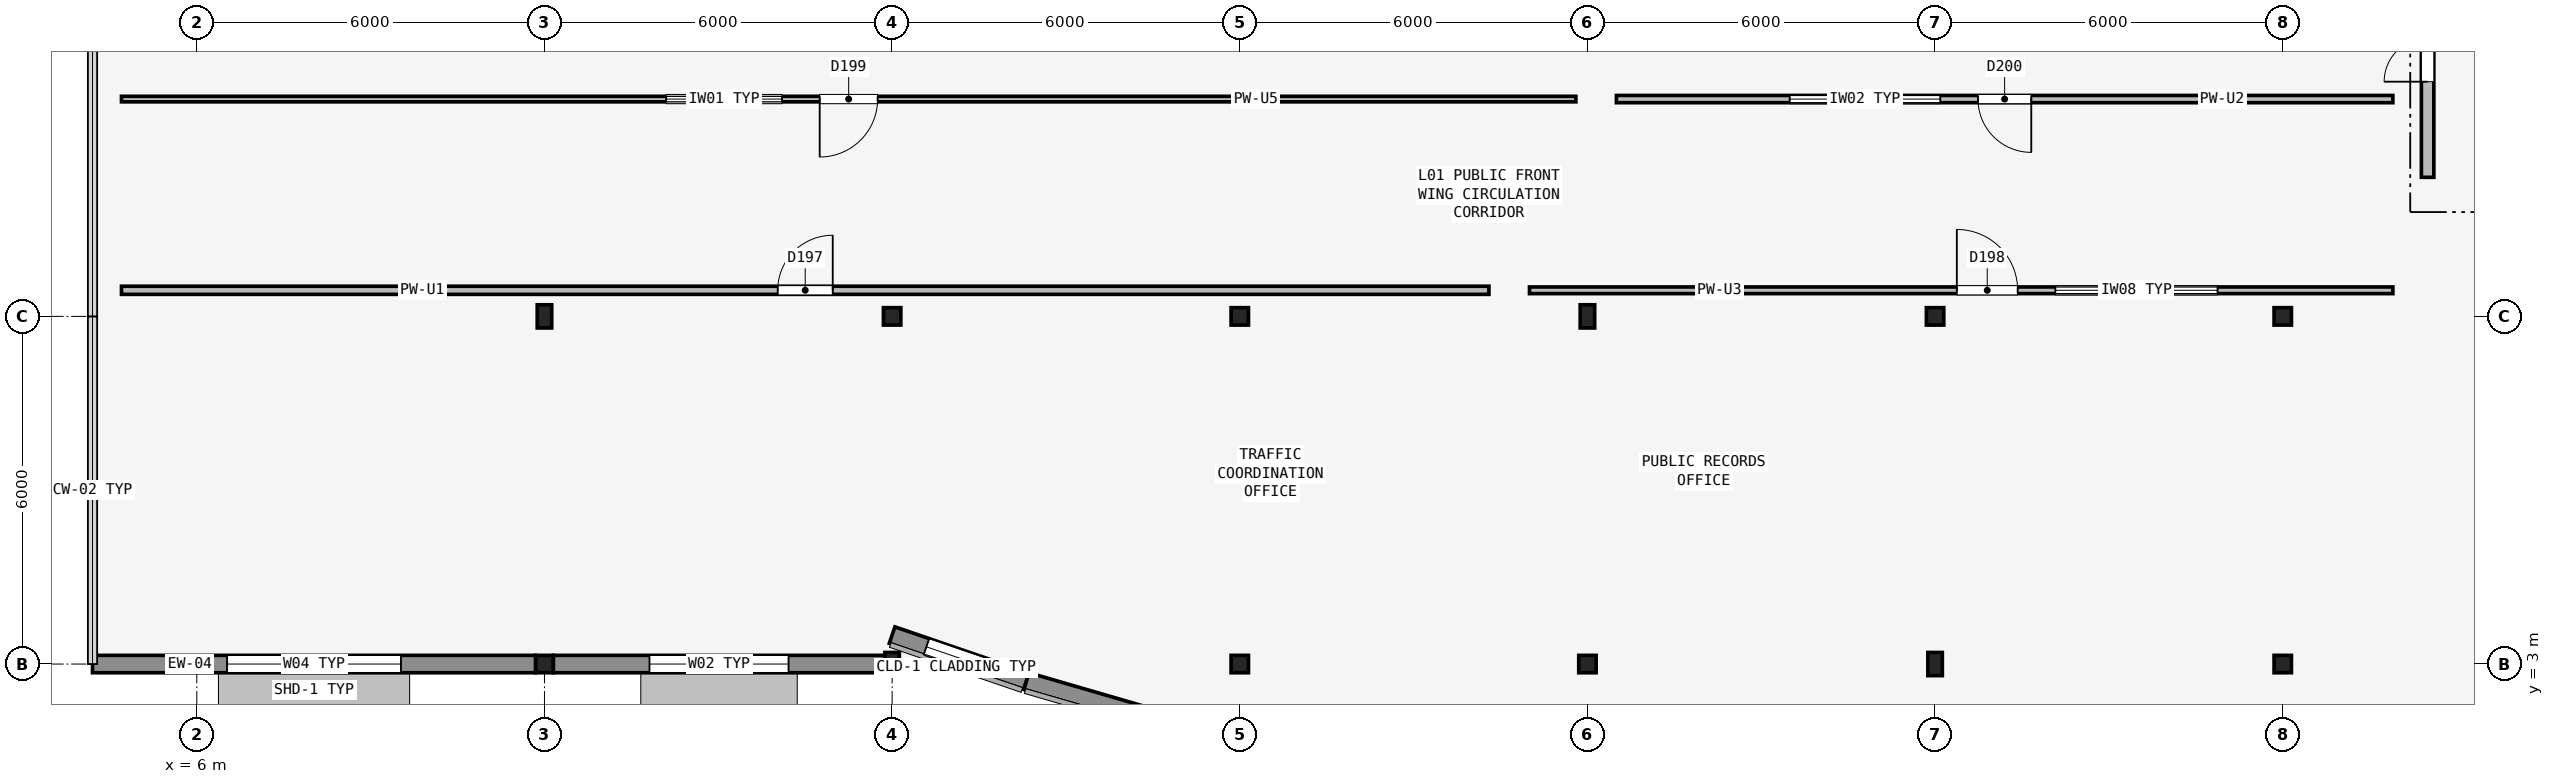
"""IFC4 building model, lengths in metres.
Left out: names, types, materials, properties, quantities, classifications, styles, units other than length and angle.
Written with IfcOpenShell. Run it as: python <this file> out.ifc"""

import sys

from ifc_helpers import new_model, si_unit, direction, frame, frame_2d, origin, origin_2d, place, context, subcontext, project, spatial, rectangle, hollow_rectangle, i_section, extrude, element, fill, save


model = new_model("IFC4")
c1 = context("Model", 3, precision=1e-05, world=origin(), true_north=direction((0.0, 1.0)))
c2 = subcontext(c1, "Body", "Model", "MODEL_VIEW")
j1 = project(units=[si_unit("LENGTHUNIT", "METRE"), si_unit("PLANEANGLEUNIT", "RADIAN")], contexts=[c1])
p1 = place(None, origin())
s1 = spatial("IfcSite", under=j1, at=p1, CompositionType="ELEMENT")
p2 = place(p1, origin())
s2 = spatial("IfcBuilding", under=s1, at=p2, CompositionType="ELEMENT")
p3 = place(p2, frame((0.0, 0.0, 4.8)))
s3 = spatial("IfcBuildingStorey", under=s2, at=p3, CompositionType="ELEMENT", Elevation=4.8)
p4 = place(p3, frame((12.0, 3.0, 0.0), z_axis=(0.0, 0.0, 1.0), x_axis=(1.0, 0.0, 0.0)))
e1 = element("IfcColumn", 1, at=p4, inside=s3, PredefinedType="COLUMN", context=c2, shape_type="SweptSolid", body=[
    extrude(hollow_rectangle(XDim=0.3, YDim=0.3, WallThickness=0.016, InnerFilletRadius=0.016, OuterFilletRadius=0.032, at=origin_2d()), origin(), (0.0, 0.0, 1.0), 4.5),
])
for number, where, z_axis, x_axis in (
    (2, (12.0, 9.0, 0.0), (0.0, 0.0, 1.0), (1.0, 0.0, 0.0)),
    (3, (18.0, 3.0, 0.0), (0.0, 0.0, 1.0), (1.0, 0.0, 0.0)),
):
    element("IfcColumn", number, at=place(p3, frame(where, z_axis=z_axis, x_axis=x_axis)), inside=s3, PredefinedType="COLUMN", context=c2, shape_type="SweptSolid", body=[
        extrude(i_section(OverallWidth=0.25, OverallDepth=0.4, WebThickness=0.01, FlangeThickness=0.013, FilletRadius=0.014, at=origin_2d()), origin(), (0.0, 0.0, 1.0), 4.5),
    ])
for number, where, z_axis, x_axis in (
    (4, (18.0, 9.0, 0.0), (0.0, 0.0, 1.0), (1.0, 0.0, 0.0)),
    (5, (24.0, 3.0, 0.0), (0.0, 0.0, 1.0), (1.0, 0.0, 0.0)),
    (6, (24.0, 9.0, 0.0), (0.0, 0.0, 1.0), (1.0, 0.0, 0.0)),
    (7, (30.0, 3.0, 0.0), (0.0, 0.0, 1.0), (1.0, 0.0, 0.0)),
):
    element("IfcColumn", number, at=place(p3, frame(where, z_axis=z_axis, x_axis=x_axis)), inside=s3, PredefinedType="COLUMN", context=c2, shape_type="SweptSolid", body=[
        extrude(hollow_rectangle(XDim=0.3, YDim=0.3, WallThickness=0.016, InnerFilletRadius=0.016, OuterFilletRadius=0.032, at=origin_2d()), origin(), (0.0, 0.0, 1.0), 4.5),
    ])
for number, where, z_axis, x_axis in (
    (8, (30.0, 9.0, 0.0), (0.0, 0.0, 1.0), (1.0, 0.0, 0.0)),
    (9, (36.0, 3.0, 0.0), (0.0, 0.0, 1.0), (1.0, 0.0, 0.0)),
):
    element("IfcColumn", number, at=place(p3, frame(where, z_axis=z_axis, x_axis=x_axis)), inside=s3, PredefinedType="COLUMN", context=c2, shape_type="SweptSolid", body=[
        extrude(i_section(OverallWidth=0.25, OverallDepth=0.4, WebThickness=0.01, FlangeThickness=0.013, FilletRadius=0.014, at=origin_2d()), origin(), (0.0, 0.0, 1.0), 4.5),
    ])
for number, where, z_axis, x_axis in (
    (10, (36.0, 9.0, 0.0), (0.0, 0.0, 1.0), (1.0, 0.0, 0.0)),
    (11, (42.0, 3.0, 0.0), (0.0, 0.0, 1.0), (1.0, 0.0, 0.0)),
    (12, (42.0, 9.0, 0.0), (0.0, 0.0, 1.0), (1.0, 0.0, 0.0)),
):
    element("IfcColumn", number, at=place(p3, frame(where, z_axis=z_axis, x_axis=x_axis)), inside=s3, PredefinedType="COLUMN", context=c2, shape_type="SweptSolid", body=[
        extrude(hollow_rectangle(XDim=0.3, YDim=0.3, WallThickness=0.016, InnerFilletRadius=0.016, OuterFilletRadius=0.032, at=origin_2d()), origin(), (0.0, 0.0, 1.0), 4.5),
    ])
p5 = place(p3, frame((4.2, 3.0, 0.0), z_axis=(0.0, 0.0, 1.0), x_axis=(1.0, 0.0, 0.0)))
e13 = element("IfcWall", 13, at=p5, inside=s3, PredefinedType="SOLIDWALL", context=c2, shape_type="SweptSolid", body=[
    extrude(rectangle(XDim=7.646, YDim=0.3, at=frame_2d((3.823, 0.0))), origin(), (0.0, 0.0, 1.0), 3.19),
])
p6 = place(p5, frame((2.323, 0.0, 0.9)))
e14 = element("IfcOpeningElement", 14, at=p6, cuts=e13, PredefinedType="OPENING", context=c2, shape_type="SweptSolid", body=[
    extrude(rectangle(XDim=3.0, YDim=1.5, at=frame_2d((1.5, 0.75))), frame((0.0, 0.16, 0.0), z_axis=(0.0, -1.0, 0.0), x_axis=(1.0, 0.0, 0.0)), (0.0, 0.0, 1.0), 0.32),
])
p7 = place(p3, frame((12.154, 3.0, 0.0), z_axis=(0.0, 0.0, 1.0), x_axis=(1.0, 0.0, 0.0)))
e15 = element("IfcWall", 15, at=p7, inside=s3, PredefinedType="SOLIDWALL", context=c2, shape_type="SweptSolid", body=[
    extrude(rectangle(XDim=5.717, YDim=0.3, at=frame_2d((2.858, 0.0))), origin(), (0.0, 0.0, 1.0), 3.19),
])
p8 = place(p7, frame((1.658, 0.0, 0.9)))
e16 = element("IfcOpeningElement", 16, at=p8, cuts=e15, PredefinedType="OPENING", context=c2, shape_type="SweptSolid", body=[
    extrude(rectangle(XDim=2.4, YDim=1.5, at=frame_2d((1.2, 0.75))), frame((0.0, 0.16, 0.0), z_axis=(0.0, -1.0, 0.0), x_axis=(1.0, 0.0, 0.0)), (0.0, 0.0, 1.0), 0.32),
])
p9 = place(p3, frame((18.0, 3.5, 0.0), z_axis=(0.0, 0.0, 1.0), x_axis=(0.946091693708, -0.323898914937, 0.0)))
e17 = element("IfcWall", 17, at=p9, inside=s3, PredefinedType="SOLIDWALL", context=c2, shape_type="SweptSolid", body=[
    extrude(rectangle(XDim=2.45, YDim=0.3, at=frame_2d((1.225, 0.0))), origin(), (0.0, 0.0, 1.0), 3.55),
])
p10 = place(p9, frame((0.625, 0.0, 0.9)))
e18 = element("IfcOpeningElement", 18, at=p10, cuts=e17, PredefinedType="OPENING", context=c2, shape_type="SweptSolid", body=[
    extrude(rectangle(XDim=1.2, YDim=1.5, at=frame_2d((0.6, 0.75))), frame((0.0, 0.16, 0.0), z_axis=(0.0, -1.0, 0.0), x_axis=(1.0, 0.0, 0.0)), (0.0, 0.0, 1.0), 0.32),
])
p11 = place(p3, frame((20.318, 2.706, 0.0), z_axis=(0.0, 0.0, 1.0), x_axis=(0.960269600698, -0.279073993728, 0.0)))
e19 = element("IfcWall", 19, at=p11, inside=s3, PredefinedType="SOLIDWALL", context=c2, shape_type="SweptSolid", body=[
    extrude(rectangle(XDim=2.45, YDim=0.3, at=frame_2d((1.225, 0.0))), origin(), (0.0, 0.0, 1.0), 3.55),
])
p12 = place(p3, frame((44.5, 11.4, 0.0), z_axis=(0.0, 0.0, 1.0), x_axis=(0.0, 1.0, 0.0)))
e20 = element("IfcWall", 20, at=p12, inside=s3, PredefinedType="PARTITIONING", context=c2, shape_type="SweptSolid", body=[
    extrude(rectangle(XDim=4.8, YDim=0.215, at=frame_2d((2.4, 0.0))), origin(), (0.0, 0.0, 1.0), 3.64),
])
p13 = place(p12, frame((1.65, 0.0, 0.0)))
e21 = element("IfcOpeningElement", 21, at=p13, cuts=e20, PredefinedType="OPENING", context=c2, shape_type="SweptSolid", body=[
    extrude(rectangle(XDim=1.5, YDim=2.15, at=frame_2d((0.75, 1.075))), frame((0.0, 0.117, 0.0), z_axis=(0.0, -1.0, 0.0), x_axis=(1.0, 0.0, 0.0)), (0.0, 0.0, 1.0), 0.235),
])
p14 = place(p3, frame((4.7, 9.45, 0.0), z_axis=(0.0, 0.0, 1.0), x_axis=(1.0, 0.0, 0.0)))
e22 = element("IfcWall", 22, at=p14, inside=s3, PredefinedType="PARTITIONING", context=c2, shape_type="SweptSolid", body=[
    extrude(rectangle(XDim=23.6, YDim=0.14, at=frame_2d((11.8, 0.0))), origin(), (0.0, 0.0, 1.0), 3.783),
])
p15 = place(p14, frame((11.325, 0.0, 0.0)))
e23 = element("IfcOpeningElement", 23, at=p15, cuts=e22, PredefinedType="OPENING", context=c2, shape_type="SweptSolid", body=[
    extrude(rectangle(XDim=0.95, YDim=2.15, at=frame_2d((0.475, 1.075))), frame((0.0, 0.08, 0.0), z_axis=(0.0, -1.0, 0.0), x_axis=(1.0, 0.0, 0.0)), (0.0, 0.0, 1.0), 0.16),
])
p16 = place(p3, frame((29.0, 9.45, 0.0), z_axis=(0.0, 0.0, 1.0), x_axis=(1.0, 0.0, 0.0)))
e24 = element("IfcWall", 24, at=p16, inside=s3, PredefinedType="PARTITIONING", context=c2, shape_type="SweptSolid", body=[
    extrude(rectangle(XDim=14.9, YDim=0.115, at=frame_2d((7.45, 0.0))), origin(), (0.0, 0.0, 1.0), 3.783),
])
p17 = place(p16, frame((7.375, 0.0, 0.0)))
e25 = element("IfcOpeningElement", 25, at=p17, cuts=e24, PredefinedType="OPENING", context=c2, shape_type="SweptSolid", body=[
    extrude(rectangle(XDim=1.05, YDim=2.2, at=frame_2d((0.525, 1.1))), frame((0.0, 0.067, 0.0), z_axis=(0.0, -1.0, 0.0), x_axis=(1.0, 0.0, 0.0)), (0.0, 0.0, 1.0), 0.135),
])
p18 = place(p16, frame((9.075, 0.0, 0.9)))
e26 = element("IfcOpeningElement", 26, at=p18, cuts=e24, PredefinedType="OPENING", context=c2, shape_type="SweptSolid", body=[
    extrude(rectangle(XDim=2.8, YDim=1.5, at=frame_2d((1.4, 0.75))), frame((0.0, 0.067, 0.0), z_axis=(0.0, -1.0, 0.0), x_axis=(1.0, 0.0, 0.0)), (0.0, 0.0, 1.0), 0.135),
])
p19 = place(p3, frame((29.8, 12.75, 0.0), z_axis=(0.0, 0.0, 1.0), x_axis=(-1.0, 0.0, 0.0)))
e27 = element("IfcWall", 27, at=p19, inside=s3, PredefinedType="PARTITIONING", context=c2, shape_type="SweptSolid", body=[
    extrude(rectangle(XDim=25.1, YDim=0.095, at=frame_2d((12.55, 0.0))), origin(), (0.0, 0.0, 1.0), 3.783),
])
p20 = place(p19, frame((12.05, 0.0, 0.0)))
e28 = element("IfcOpeningElement", 28, at=p20, cuts=e27, PredefinedType="OPENING", context=c2, shape_type="SweptSolid", body=[
    extrude(rectangle(XDim=1.0, YDim=2.15, at=frame_2d((0.5, 1.075))), frame((0.0, 0.057, 0.0), z_axis=(0.0, -1.0, 0.0), x_axis=(1.0, 0.0, 0.0)), (0.0, 0.0, 1.0), 0.115),
])
p21 = place(p19, frame((13.7, 0.0, 1.0)))
e29 = element("IfcOpeningElement", 29, at=p21, cuts=e27, PredefinedType="OPENING", context=c2, shape_type="SweptSolid", body=[
    extrude(rectangle(XDim=2.0, YDim=1.2, at=frame_2d((1.0, 0.6))), frame((0.0, 0.057, 0.0), z_axis=(0.0, -1.0, 0.0), x_axis=(1.0, 0.0, 0.0)), (0.0, 0.0, 1.0), 0.115),
])
p22 = place(p3, frame((43.9, 12.75, 0.0), z_axis=(0.0, 0.0, 1.0), x_axis=(-1.0, 0.0, 0.0)))
e30 = element("IfcWall", 30, at=p22, inside=s3, PredefinedType="PARTITIONING", context=c2, shape_type="SweptSolid", body=[
    extrude(rectangle(XDim=13.4, YDim=0.125, at=frame_2d((6.7, 0.0))), origin(), (0.0, 0.0, 1.0), 3.783),
])
p23 = place(p22, frame((6.24, 0.0, 0.0)))
e31 = element("IfcOpeningElement", 31, at=p23, cuts=e30, PredefinedType="OPENING", context=c2, shape_type="SweptSolid", body=[
    extrude(rectangle(XDim=0.92, YDim=2.1, at=frame_2d((0.46, 1.05))), frame((0.0, 0.073, 0.0), z_axis=(0.0, -1.0, 0.0), x_axis=(1.0, 0.0, 0.0)), (0.0, 0.0, 1.0), 0.145),
])
p24 = place(p22, frame((7.81, 0.0, 1.0)))
e32 = element("IfcOpeningElement", 32, at=p24, cuts=e30, PredefinedType="OPENING", context=c2, shape_type="SweptSolid", body=[
    extrude(rectangle(XDim=2.6, YDim=1.2, at=frame_2d((1.3, 0.6))), frame((0.0, 0.073, 0.0), z_axis=(0.0, -1.0, 0.0), x_axis=(1.0, 0.0, 0.0)), (0.0, 0.0, 1.0), 0.145),
])
p25 = place(p6, origin())
e33 = element("IfcWindow", 33, at=p25, inside=s3, PartitioningType="SINGLE_PANEL", PredefinedType="WINDOW", context=c2, shape_type="SweptSolid", body=[
    extrude(rectangle(XDim=3.0, YDim=1.5, at=frame_2d((1.5, 0.75))), frame((0.0, 0.03, 0.0), z_axis=(0.0, -1.0, 0.0), x_axis=(1.0, 0.0, 0.0)), (0.0, 0.0, 1.0), 0.06),
])
fill(e14, e33)
p26 = place(p8, origin())
e34 = element("IfcWindow", 34, at=p26, inside=s3, PartitioningType="SINGLE_PANEL", PredefinedType="WINDOW", context=c2, shape_type="SweptSolid", body=[
    extrude(rectangle(XDim=2.4, YDim=1.5, at=frame_2d((1.2, 0.75))), frame((0.0, 0.03, 0.0), z_axis=(0.0, -1.0, 0.0), x_axis=(1.0, 0.0, 0.0)), (0.0, 0.0, 1.0), 0.06),
])
fill(e16, e34)
p27 = place(p10, origin())
e35 = element("IfcWindow", 35, at=p27, inside=s3, PartitioningType="SINGLE_PANEL", PredefinedType="WINDOW", context=c2, shape_type="SweptSolid", body=[
    extrude(rectangle(XDim=1.2, YDim=1.5, at=frame_2d((0.6, 0.75))), frame((0.0, 0.03, 0.0), z_axis=(0.0, -1.0, 0.0), x_axis=(1.0, 0.0, 0.0)), (0.0, 0.0, 1.0), 0.06),
])
fill(e18, e35)
p28 = place(p13, origin())
e36 = element("IfcDoor", 36, at=p28, inside=s3, OperationType="DOUBLE_DOOR_SINGLE_SWING", PredefinedType="DOOR", context=c2, shape_type="SweptSolid", body=[
    extrude(rectangle(XDim=1.5, YDim=2.15, at=frame_2d((0.75, 1.075))), frame((0.0, 0.025, 0.0), z_axis=(0.0, -1.0, 0.0), x_axis=(1.0, 0.0, 0.0)), (0.0, 0.0, 1.0), 0.05),
])
fill(e21, e36)
p29 = place(p15, origin())
e37 = element("IfcDoor", 37, at=p29, inside=s3, OperationType="SINGLE_SWING_RIGHT", PredefinedType="DOOR", context=c2, shape_type="SweptSolid", body=[
    extrude(rectangle(XDim=0.95, YDim=2.15, at=frame_2d((0.475, 1.075))), frame((0.0, 0.025, 0.0), z_axis=(0.0, -1.0, 0.0), x_axis=(1.0, 0.0, 0.0)), (0.0, 0.0, 1.0), 0.05),
])
fill(e23, e37)
p30 = place(p17, origin())
e38 = element("IfcDoor", 38, at=p30, inside=s3, OperationType="SINGLE_SWING_LEFT", PredefinedType="DOOR", context=c2, shape_type="SweptSolid", body=[
    extrude(rectangle(XDim=1.05, YDim=2.2, at=frame_2d((0.525, 1.1))), frame((0.0, 0.025, 0.0), z_axis=(0.0, -1.0, 0.0), x_axis=(1.0, 0.0, 0.0)), (0.0, 0.0, 1.0), 0.05),
])
fill(e25, e38)
p31 = place(p18, origin())
e39 = element("IfcWindow", 39, at=p31, inside=s3, PartitioningType="SINGLE_PANEL", PredefinedType="WINDOW", context=c2, shape_type="SweptSolid", body=[
    extrude(rectangle(XDim=2.8, YDim=1.5, at=frame_2d((1.4, 0.75))), frame((0.0, 0.03, 0.0), z_axis=(0.0, -1.0, 0.0), x_axis=(1.0, 0.0, 0.0)), (0.0, 0.0, 1.0), 0.06),
])
fill(e26, e39)
p32 = place(p20, origin())
e40 = element("IfcDoor", 40, at=p32, inside=s3, OperationType="SINGLE_SWING_RIGHT", PredefinedType="DOOR", context=c2, shape_type="SweptSolid", body=[
    extrude(rectangle(XDim=1.0, YDim=2.15, at=frame_2d((0.5, 1.075))), frame((0.0, 0.025, 0.0), z_axis=(0.0, -1.0, 0.0), x_axis=(1.0, 0.0, 0.0)), (0.0, 0.0, 1.0), 0.05),
])
fill(e28, e40)
p33 = place(p21, origin())
e41 = element("IfcWindow", 41, at=p33, inside=s3, PartitioningType="SINGLE_PANEL", PredefinedType="WINDOW", context=c2, shape_type="SweptSolid", body=[
    extrude(rectangle(XDim=2.0, YDim=1.2, at=frame_2d((1.0, 0.6))), frame((0.0, 0.03, 0.0), z_axis=(0.0, -1.0, 0.0), x_axis=(1.0, 0.0, 0.0)), (0.0, 0.0, 1.0), 0.06),
])
fill(e29, e41)
p34 = place(p23, origin())
e42 = element("IfcDoor", 42, at=p34, inside=s3, OperationType="SINGLE_SWING_LEFT", PredefinedType="DOOR", context=c2, shape_type="SweptSolid", body=[
    extrude(rectangle(XDim=0.92, YDim=2.1, at=frame_2d((0.46, 1.05))), frame((0.0, 0.025, 0.0), z_axis=(0.0, -1.0, 0.0), x_axis=(1.0, 0.0, 0.0)), (0.0, 0.0, 1.0), 0.05),
])
fill(e31, e42)
p35 = place(p24, origin())
e43 = element("IfcWindow", 43, at=p35, inside=s3, PartitioningType="SINGLE_PANEL", PredefinedType="WINDOW", context=c2, shape_type="SweptSolid", body=[
    extrude(rectangle(XDim=2.6, YDim=1.2, at=frame_2d((1.3, 0.6))), frame((0.0, 0.03, 0.0), z_axis=(0.0, -1.0, 0.0), x_axis=(1.0, 0.0, 0.0)), (0.0, 0.0, 1.0), 0.06),
])
fill(e32, e43)
save(model, sys.argv[1])
